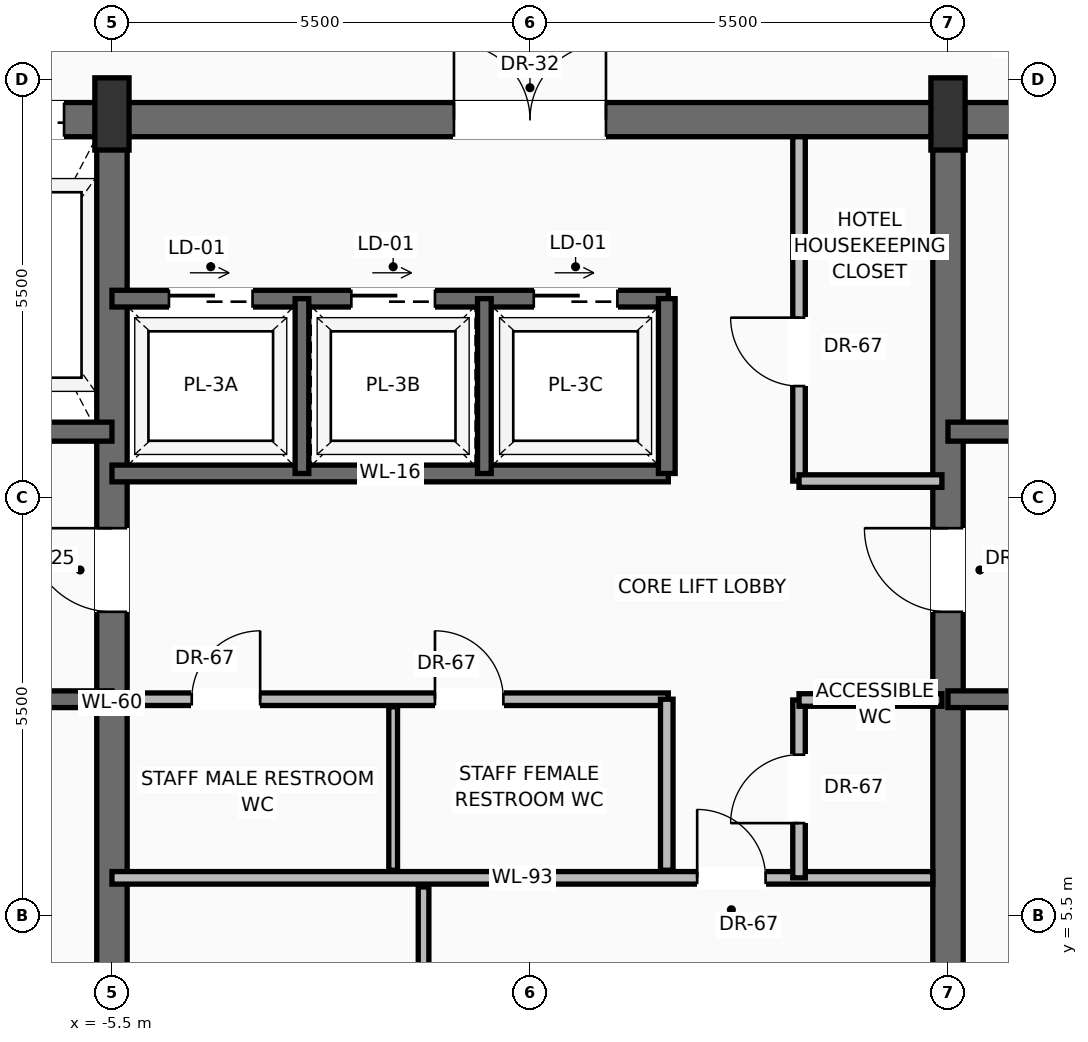
"""IFC4 building model, lengths in metres.
Left out: names, types, materials, properties, quantities, classifications, styles, units other than length and angle.
Written with IfcOpenShell. Run it as: python <this file> out.ifc"""

import sys

from ifc_helpers import new_model, si_unit, direction, frame, frame_2d, origin, origin_2d, place, context, subcontext, project, spatial, rectangle, extrude, source, transform, mapped, element, fill, save


model = new_model("IFC4")
c1 = context("Model", 3, precision=1e-05, world=origin(), true_north=direction((0.0, 1.0)))
c2 = subcontext(c1, "Body", "Model", "MODEL_VIEW")
j1 = project(units=[si_unit("LENGTHUNIT", "METRE"), si_unit("PLANEANGLEUNIT", "RADIAN")], contexts=[c1])
p1 = place(None, origin())
s1 = spatial("IfcSite", under=j1, at=p1, CompositionType="ELEMENT")
p2 = place(p1, origin())
s2 = spatial("IfcBuilding", under=s1, at=p2, CompositionType="ELEMENT")
p3 = place(p2, frame((0.0, 0.0, 297.15)))
s3 = spatial("IfcBuildingStorey", under=s2, at=p3, CompositionType="ELEMENT", Elevation=297.15)
p4 = place(p3, frame((-10.6, 15.975, 0.0), z_axis=(0.0, 0.0, 1.0), x_axis=(1.0, 0.0, 0.0)))
e1 = element("IfcWall", 1, at=p4, inside=s3, PredefinedType="SHEAR", context=c2, shape_type="SweptSolid", body=[
    extrude(rectangle(XDim=21.2, YDim=0.45, at=frame_2d((10.6, 0.0))), origin(), (0.0, 0.0, 1.0), 3.24),
])
p5 = place(p4, frame((3.17, 0.0, 0.0)))
e2 = element("IfcOpeningElement", 2, at=p5, cuts=e1, PredefinedType="OPENING", context=c2, shape_type="SweptSolid", body=[
    extrude(rectangle(XDim=1.3, YDim=2.3, at=frame_2d((0.65, 1.15))), frame((0.0, 0.235, 0.0), z_axis=(0.0, -1.0, 0.0), x_axis=(1.0, 0.0, 0.0)), (0.0, 0.0, 1.0), 0.47),
])
p6 = place(p4, frame((9.6, 0.0, 0.0)))
e3 = element("IfcOpeningElement", 3, at=p6, cuts=e1, PredefinedType="OPENING", context=c2, shape_type="SweptSolid", body=[
    extrude(rectangle(XDim=2.0, YDim=2.4, at=frame_2d((1.0, 1.2))), frame((0.0, 0.235, 0.0), z_axis=(0.0, -1.0, 0.0), x_axis=(1.0, 0.0, 0.0)), (0.0, 0.0, 1.0), 0.47),
])
p7 = place(p3, frame((-5.5, 0.625, 0.0), z_axis=(0.0, 0.0, 1.0), x_axis=(0.0, 1.0, 0.0)))
e4 = element("IfcWall", 4, at=p7, inside=s3, PredefinedType="SHEAR", context=c2, shape_type="SweptSolid", body=[
    extrude(rectangle(XDim=15.35, YDim=0.4, at=frame_2d((7.675, 0.0))), origin(), (0.0, 0.0, 1.0), 3.24),
])
p8 = place(p7, frame((8.875, 0.0, 0.0)))
e5 = element("IfcOpeningElement", 5, at=p8, cuts=e4, PredefinedType="OPENING", context=c2, shape_type="SweptSolid", body=[
    extrude(rectangle(XDim=1.1, YDim=2.2, at=frame_2d((0.55, 1.1))), frame((0.0, 0.21, 0.0), z_axis=(0.0, -1.0, 0.0), x_axis=(1.0, 0.0, 0.0)), (0.0, 0.0, 1.0), 0.42),
])
p9 = place(p3, frame((5.5, 0.625, 0.0), z_axis=(0.0, 0.0, 1.0), x_axis=(0.0, 1.0, 0.0)))
e6 = element("IfcWall", 6, at=p9, inside=s3, PredefinedType="SHEAR", context=c2, shape_type="SweptSolid", body=[
    extrude(rectangle(XDim=15.35, YDim=0.4, at=frame_2d((7.675, 0.0))), origin(), (0.0, 0.0, 1.0), 3.24),
])
p10 = place(p9, frame((8.875, 0.0, 0.0)))
e7 = element("IfcOpeningElement", 7, at=p10, cuts=e6, PredefinedType="OPENING", context=c2, shape_type="SweptSolid", body=[
    extrude(rectangle(XDim=1.1, YDim=2.2, at=frame_2d((0.55, 1.1))), frame((0.0, 0.21, 0.0), z_axis=(0.0, -1.0, 0.0), x_axis=(1.0, 0.0, 0.0)), (0.0, 0.0, 1.0), 0.42),
])
m1 = source(origin(), c2, "Body", "SweptSolid", [
    extrude(rectangle(XDim=0.45, YDim=0.95, at=origin_2d()), origin(), (0.0, 0.0, 1.0), 3.45),
])
for number, where, z_axis, x_axis in (
    (8, (-5.5, 16.05, 0.0), (0.0, 0.0, 1.0), (1.0, 0.0, 0.0)),
    (9, (5.5, 16.05, 0.0), (0.0, 0.0, 1.0), (1.0, 0.0, 0.0)),
):
    element("IfcColumn", number, at=place(p3, frame(where, z_axis=z_axis, x_axis=x_axis)), inside=s3, PredefinedType="PILASTER", context=c2, shape_type="MappedRepresentation", body=[
        mapped(m1, transform((0.0, 0.0, 0.0), scale=1.0)),
    ])
p11 = place(p3, frame((-5.5, 8.35, 0.0), z_axis=(0.0, 0.0, 1.0), x_axis=(-1.0, 0.0, 0.0)))
e10 = element("IfcWall", 10, at=p11, inside=s3, PredefinedType="SOLIDWALL", context=c2, shape_type="SweptSolid", body=[
    extrude(rectangle(XDim=4.65, YDim=0.22, at=frame_2d((2.325, 0.0))), origin(), (0.0, 0.0, 1.0), 3.24),
])
p12 = place(p11, frame((2.5, 0.0, 0.0)))
e11 = element("IfcOpeningElement", 11, at=p12, cuts=e10, PredefinedType="OPENING", context=c2, shape_type="SweptSolid", body=[
    extrude(rectangle(XDim=1.15, YDim=2.2, at=frame_2d((0.575, 1.1))), frame((0.0, 0.12, 0.0), z_axis=(0.0, -1.0, 0.0), x_axis=(1.0, 0.0, 0.0)), (0.0, 0.0, 1.0), 0.24),
])
p13 = place(p3, frame((-5.5, 11.87, 0.0), z_axis=(0.0, 0.0, 1.0), x_axis=(-1.0, 0.0, 0.0)))
e12 = element("IfcWall", 12, at=p13, inside=s3, PredefinedType="SOLIDWALL", context=c2, shape_type="SweptSolid", body=[
    extrude(rectangle(XDim=4.65, YDim=0.25, at=frame_2d((2.325, 0.0))), origin(), (0.0, 0.0, 1.0), 3.24),
])
p14 = place(p13, frame((2.95, 0.0, 0.0)))
e13 = element("IfcOpeningElement", 13, at=p14, cuts=e12, PredefinedType="OPENING", context=c2, shape_type="SweptSolid", body=[
    extrude(rectangle(XDim=1.2, YDim=2.25, at=frame_2d((0.6, 1.125))), frame((0.0, 0.135, 0.0), z_axis=(0.0, -1.0, 0.0), x_axis=(1.0, 0.0, 0.0)), (0.0, 0.0, 1.0), 0.27),
])
p15 = place(p3, frame((10.15, 8.35, 0.0), z_axis=(0.0, 0.0, 1.0), x_axis=(-1.0, 0.0, 0.0)))
e14 = element("IfcWall", 14, at=p15, inside=s3, PredefinedType="SOLIDWALL", context=c2, shape_type="SweptSolid", body=[
    extrude(rectangle(XDim=4.65, YDim=0.22, at=frame_2d((2.325, 0.0))), origin(), (0.0, 0.0, 1.0), 3.24),
])
p16 = place(p15, frame((1.0, 0.0, 0.0)))
e15 = element("IfcOpeningElement", 15, at=p16, cuts=e14, PredefinedType="OPENING", context=c2, shape_type="SweptSolid", body=[
    extrude(rectangle(XDim=1.15, YDim=2.2, at=frame_2d((0.575, 1.1))), frame((0.0, 0.12, 0.0), z_axis=(0.0, -1.0, 0.0), x_axis=(1.0, 0.0, 0.0)), (0.0, 0.0, 1.0), 0.24),
])
p17 = place(p3, frame((10.15, 11.87, 0.0), z_axis=(0.0, 0.0, 1.0), x_axis=(-1.0, 0.0, 0.0)))
e16 = element("IfcWall", 16, at=p17, inside=s3, PredefinedType="SOLIDWALL", context=c2, shape_type="SweptSolid", body=[
    extrude(rectangle(XDim=4.65, YDim=0.25, at=frame_2d((2.325, 0.0))), origin(), (0.0, 0.0, 1.0), 3.24),
])
p18 = place(p17, frame((0.5, 0.0, 0.0)))
e17 = element("IfcOpeningElement", 17, at=p18, cuts=e16, PredefinedType="OPENING", context=c2, shape_type="SweptSolid", body=[
    extrude(rectangle(XDim=1.2, YDim=2.25, at=frame_2d((0.6, 1.125))), frame((0.0, 0.135, 0.0), z_axis=(0.0, -1.0, 0.0), x_axis=(1.0, 0.0, 0.0)), (0.0, 0.0, 1.0), 0.27),
])
p19 = place(p3, frame((-5.5, 6.0, 0.0), z_axis=(0.0, 0.0, 1.0), x_axis=(1.0, 0.0, 0.0)))
e18 = element("IfcWall", 18, at=p19, inside=s3, PredefinedType="PARTITIONING", context=c2, shape_type="SweptSolid", body=[
    extrude(rectangle(XDim=10.8, YDim=0.165, at=frame_2d((5.4, 0.0))), origin(), (0.0, 0.0, 1.0), 3.232),
])
p20 = place(p19, frame((7.7, 0.0, 0.0)))
e19 = element("IfcOpeningElement", 19, at=p20, cuts=e18, PredefinedType="OPENING", context=c2, shape_type="SweptSolid", body=[
    extrude(rectangle(XDim=0.9, YDim=2.1, at=frame_2d((0.45, 1.05))), frame((0.0, 0.093, 0.0), z_axis=(0.0, -1.0, 0.0), x_axis=(1.0, 0.0, 0.0)), (0.0, 0.0, 1.0), 0.185),
])
p21 = place(p3, frame((-1.4, 0.85, 0.0), z_axis=(0.0, 0.0, 1.0), x_axis=(0.0, 1.0, 0.0)))
e20 = element("IfcWall", 20, at=p21, inside=s3, PredefinedType="PARTITIONING", context=c2, shape_type="SweptSolid", body=[
    extrude(rectangle(XDim=5.03, YDim=0.14, at=frame_2d((2.515, 0.0))), origin(), (0.0, 0.0, 1.0), 3.232),
])
p22 = place(p21, frame((2.1, 0.0, 0.0)))
e21 = element("IfcOpeningElement", 21, at=p22, cuts=e20, PredefinedType="OPENING", context=c2, shape_type="SweptSolid", body=[
    extrude(rectangle(XDim=0.9, YDim=2.1, at=frame_2d((0.45, 1.05))), frame((0.0, 0.08, 0.0), z_axis=(0.0, -1.0, 0.0), x_axis=(1.0, 0.0, 0.0)), (0.0, 0.0, 1.0), 0.16),
])
p23 = place(p3, frame((3.54, 6.0, 0.0), z_axis=(0.0, 0.0, 1.0), x_axis=(0.0, 1.0, 0.0)))
e22 = element("IfcWall", 22, at=p23, inside=s3, PredefinedType="PARTITIONING", context=c2, shape_type="SweptSolid", body=[
    extrude(rectangle(XDim=2.34, YDim=0.165, at=frame_2d((1.17, 0.0))), origin(), (0.0, 0.0, 1.0), 3.232),
])
p24 = place(p23, frame((0.72, 0.0, 0.0)))
e23 = element("IfcOpeningElement", 23, at=p24, cuts=e22, PredefinedType="OPENING", context=c2, shape_type="SweptSolid", body=[
    extrude(rectangle(XDim=0.9, YDim=2.1, at=frame_2d((0.45, 1.05))), frame((0.0, 0.093, 0.0), z_axis=(0.0, -1.0, 0.0), x_axis=(1.0, 0.0, 0.0)), (0.0, 0.0, 1.0), 0.185),
])
p25 = place(p3, frame((3.54, 8.34, 0.0), z_axis=(0.0, 0.0, 1.0), x_axis=(1.0, 0.0, 0.0)))
e24 = element("IfcWall", 24, at=p25, inside=s3, PredefinedType="PARTITIONING", context=c2, shape_type="SweptSolid", body=[
    extrude(rectangle(XDim=1.88, YDim=0.165, at=frame_2d((0.94, 0.0))), origin(), (0.0, 0.0, 1.0), 3.232),
])
p26 = place(p3, frame((-5.3, 8.35, 0.0), z_axis=(0.0, 0.0, 1.0), x_axis=(1.0, 0.0, 0.0)))
e25 = element("IfcWall", 25, at=p26, inside=s3, PredefinedType="PARTITIONING", context=c2, shape_type="SweptSolid", body=[
    extrude(rectangle(XDim=7.12, YDim=0.165, at=frame_2d((3.56, 0.0))), origin(), (0.0, 0.0, 1.0), 3.232),
])
p27 = place(p26, frame((0.85, 0.0, 0.0)))
e26 = element("IfcOpeningElement", 26, at=p27, cuts=e25, PredefinedType="OPENING", context=c2, shape_type="SweptSolid", body=[
    extrude(rectangle(XDim=0.9, YDim=2.1, at=frame_2d((0.45, 1.05))), frame((0.0, 0.093, 0.0), z_axis=(0.0, -1.0, 0.0), x_axis=(1.0, 0.0, 0.0)), (0.0, 0.0, 1.0), 0.185),
])
p28 = place(p26, frame((4.05, 0.0, 0.0)))
e27 = element("IfcOpeningElement", 27, at=p28, cuts=e25, PredefinedType="OPENING", context=c2, shape_type="SweptSolid", body=[
    extrude(rectangle(XDim=0.9, YDim=2.1, at=frame_2d((0.45, 1.05))), frame((0.0, 0.093, 0.0), z_axis=(0.0, -1.0, 0.0), x_axis=(1.0, 0.0, 0.0)), (0.0, 0.0, 1.0), 0.185),
])
p29 = place(p3, frame((1.8, 6.1, 0.0), z_axis=(0.0, 0.0, 1.0), x_axis=(0.0, 1.0, 0.0)))
e28 = element("IfcWall", 28, at=p29, inside=s3, PredefinedType="PARTITIONING", context=c2, shape_type="SweptSolid", body=[
    extrude(rectangle(XDim=2.25, YDim=0.165, at=frame_2d((1.125, 0.0))), origin(), (0.0, 0.0, 1.0), 3.232),
])
p30 = place(p3, frame((-1.8, 6.1, 0.0), z_axis=(0.0, 0.0, 1.0), x_axis=(0.0, 1.0, 0.0)))
e29 = element("IfcWall", 29, at=p30, inside=s3, PredefinedType="PARTITIONING", context=c2, shape_type="SweptSolid", body=[
    extrude(rectangle(XDim=2.15, YDim=0.115, at=frame_2d((1.075, 0.0))), origin(), (0.0, 0.0, 1.0), 3.232),
])
p31 = place(p3, frame((-5.5, 11.32, 0.0), z_axis=(0.0, 0.0, 1.0), x_axis=(1.0, 0.0, 0.0)))
e30 = element("IfcWall", 30, at=p31, inside=s3, PredefinedType="SOLIDWALL", context=c2, shape_type="SweptSolid", body=[
    extrude(rectangle(XDim=7.32, YDim=0.22, at=frame_2d((3.66, 0.0))), origin(), (0.0, 0.0, 1.0), 3.24),
])
p32 = place(p3, frame((-5.5, 13.62, 0.0), z_axis=(0.0, 0.0, 1.0), x_axis=(1.0, 0.0, 0.0)))
e31 = element("IfcWall", 31, at=p32, inside=s3, PredefinedType="SOLIDWALL", context=c2, shape_type="SweptSolid", body=[
    extrude(rectangle(XDim=7.32, YDim=0.22, at=frame_2d((3.66, 0.0))), origin(), (0.0, 0.0, 1.0), 3.24),
])
p33 = place(p32, frame((0.75, 0.0, 0.0)))
e32 = element("IfcOpeningElement", 32, at=p33, cuts=e31, PredefinedType="OPENING", context=c2, shape_type="SweptSolid", body=[
    extrude(rectangle(XDim=1.1, YDim=2.2, at=frame_2d((0.55, 1.1))), frame((0.0, 0.12, 0.0), z_axis=(0.0, -1.0, 0.0), x_axis=(1.0, 0.0, 0.0)), (0.0, 0.0, 1.0), 0.24),
])
p34 = place(p32, frame((3.15, 0.0, 0.0)))
e33 = element("IfcOpeningElement", 33, at=p34, cuts=e31, PredefinedType="OPENING", context=c2, shape_type="SweptSolid", body=[
    extrude(rectangle(XDim=1.1, YDim=2.2, at=frame_2d((0.55, 1.1))), frame((0.0, 0.12, 0.0), z_axis=(0.0, -1.0, 0.0), x_axis=(1.0, 0.0, 0.0)), (0.0, 0.0, 1.0), 0.24),
])
p35 = place(p32, frame((5.55, 0.0, 0.0)))
e34 = element("IfcOpeningElement", 34, at=p35, cuts=e31, PredefinedType="OPENING", context=c2, shape_type="SweptSolid", body=[
    extrude(rectangle(XDim=1.1, YDim=2.2, at=frame_2d((0.55, 1.1))), frame((0.0, 0.12, 0.0), z_axis=(0.0, -1.0, 0.0), x_axis=(1.0, 0.0, 0.0)), (0.0, 0.0, 1.0), 0.24),
])
p36 = place(p3, frame((1.8, 11.32, 0.0), z_axis=(0.0, 0.0, 1.0), x_axis=(0.0, 1.0, 0.0)))
e35 = element("IfcWall", 35, at=p36, inside=s3, PredefinedType="SOLIDWALL", context=c2, shape_type="SweptSolid", body=[
    extrude(rectangle(XDim=2.3, YDim=0.22, at=frame_2d((1.15, 0.0))), origin(), (0.0, 0.0, 1.0), 3.24),
])
for number, where, z_axis, x_axis in (
    (36, (-3.0, 11.32, 0.0), (0.0, 0.0, 1.0), (0.0, 1.0, 0.0)),
    (37, (-0.6, 11.32, 0.0), (0.0, 0.0, 1.0), (0.0, 1.0, 0.0)),
):
    element("IfcWall", number, at=place(p3, frame(where, z_axis=z_axis, x_axis=x_axis)), inside=s3, PredefinedType="SOLIDWALL", context=c2, shape_type="SweptSolid", body=[
        extrude(rectangle(XDim=2.3, YDim=0.18, at=frame_2d((1.15, 0.0))), origin(), (0.0, 0.0, 1.0), 3.24),
    ])
p37 = place(p3, frame((3.54, 11.22, 0.0), z_axis=(0.0, 0.0, 1.0), x_axis=(0.0, 1.0, 0.0)))
e38 = element("IfcWall", 38, at=p37, inside=s3, PredefinedType="PARTITIONING", context=c2, shape_type="SweptSolid", body=[
    extrude(rectangle(XDim=4.53, YDim=0.165, at=frame_2d((2.265, 0.0))), origin(), (0.0, 0.0, 1.0), 3.232),
])
p38 = place(p37, frame((1.25, 0.0, 0.0)))
e39 = element("IfcOpeningElement", 39, at=p38, cuts=e38, PredefinedType="OPENING", context=c2, shape_type="SweptSolid", body=[
    extrude(rectangle(XDim=0.9, YDim=2.1, at=frame_2d((0.45, 1.05))), frame((0.0, 0.093, 0.0), z_axis=(0.0, -1.0, 0.0), x_axis=(1.0, 0.0, 0.0)), (0.0, 0.0, 1.0), 0.185),
])
p39 = place(p3, frame((3.54, 11.22, 0.0), z_axis=(0.0, 0.0, 1.0), x_axis=(1.0, 0.0, 0.0)))
e40 = element("IfcWall", 40, at=p39, inside=s3, PredefinedType="PARTITIONING", context=c2, shape_type="SweptSolid", body=[
    extrude(rectangle(XDim=1.88, YDim=0.165, at=frame_2d((0.94, 0.0))), origin(), (0.0, 0.0, 1.0), 3.232),
])
m2 = source(origin(), c2, "Body", "SweptSolid", [
    extrude(rectangle(XDim=1.1, YDim=2.2, at=frame_2d((0.55, 1.1))), frame((0.0, 0.025, 0.0), z_axis=(0.0, -1.0, 0.0), x_axis=(1.0, 0.0, 0.0)), (0.0, 0.0, 1.0), 0.05),
])
p40 = place(p8, origin())
e41 = element("IfcDoor", 41, at=p40, inside=s3, OperationType="SINGLE_SWING_RIGHT", PredefinedType="DOOR", context=c2, shape_type="MappedRepresentation", body=[
    mapped(m2, transform((0.0, 0.0, 0.0), scale=1.0)),
])
fill(e5, e41)
m3 = source(origin(), c2, "Body", "SweptSolid", [
    extrude(rectangle(XDim=1.3, YDim=2.3, at=frame_2d((0.65, 1.15))), frame((0.0, 0.025, 0.0), z_axis=(0.0, -1.0, 0.0), x_axis=(1.0, 0.0, 0.0)), (0.0, 0.0, 1.0), 0.05),
])
p41 = place(p5, origin())
e42 = element("IfcDoor", 42, at=p41, inside=s3, OperationType="SLIDING_TO_RIGHT", PredefinedType="DOOR", context=c2, shape_type="MappedRepresentation", body=[
    mapped(m3, transform((0.0, 0.0, 0.0), scale=1.0)),
])
fill(e2, e42)
p42 = place(p10, origin())
e43 = element("IfcDoor", 43, at=p42, inside=s3, OperationType="SINGLE_SWING_RIGHT", PredefinedType="DOOR", context=c2, shape_type="MappedRepresentation", body=[
    mapped(m2, transform((0.0, 0.0, 0.0), scale=1.0)),
])
fill(e7, e43)
m4 = source(origin(), c2, "Body", "SweptSolid", [
    extrude(rectangle(XDim=2.0, YDim=2.4, at=frame_2d((1.0, 1.2))), frame((0.0, 0.025, 0.0), z_axis=(0.0, -1.0, 0.0), x_axis=(1.0, 0.0, 0.0)), (0.0, 0.0, 1.0), 0.05),
])
p43 = place(p6, origin())
e44 = element("IfcDoor", 44, at=p43, inside=s3, OperationType="DOUBLE_DOOR_SINGLE_SWING", PredefinedType="DOOR", context=c2, shape_type="MappedRepresentation", body=[
    mapped(m4, transform((0.0, 0.0, 0.0), scale=1.0)),
])
fill(e3, e44)
m5 = source(origin(), c2, "Body", "SweptSolid", [
    extrude(rectangle(XDim=0.9, YDim=2.1, at=frame_2d((0.45, 1.05))), frame((0.0, 0.025, 0.0), z_axis=(0.0, -1.0, 0.0), x_axis=(1.0, 0.0, 0.0)), (0.0, 0.0, 1.0), 0.05),
])
p44 = place(p20, origin())
e45 = element("IfcDoor", 45, at=p44, inside=s3, OperationType="SINGLE_SWING_LEFT", PredefinedType="DOOR", context=c2, shape_type="MappedRepresentation", body=[
    mapped(m5, transform((0.0, 0.0, 0.0), scale=1.0)),
])
fill(e19, e45)
p45 = place(p24, origin())
e46 = element("IfcDoor", 46, at=p45, inside=s3, OperationType="SINGLE_SWING_LEFT", PredefinedType="DOOR", context=c2, shape_type="MappedRepresentation", body=[
    mapped(m5, transform((0.0, 0.0, 0.0), scale=1.0)),
])
fill(e23, e46)
p46 = place(p27, origin())
e47 = element("IfcDoor", 47, at=p46, inside=s3, OperationType="SINGLE_SWING_RIGHT", PredefinedType="DOOR", context=c2, shape_type="MappedRepresentation", body=[
    mapped(m5, transform((0.0, 0.0, 0.0), scale=1.0)),
])
fill(e26, e47)
p47 = place(p28, origin())
e48 = element("IfcDoor", 48, at=p47, inside=s3, OperationType="SINGLE_SWING_LEFT", PredefinedType="DOOR", context=c2, shape_type="MappedRepresentation", body=[
    mapped(m5, transform((0.0, 0.0, 0.0), scale=1.0)),
])
fill(e27, e48)
m6 = source(origin(), c2, "Body", "SweptSolid", [
    extrude(rectangle(XDim=1.1, YDim=2.2, at=frame_2d((0.55, 1.1))), frame((0.0, 0.025, 0.0), z_axis=(0.0, -1.0, 0.0), x_axis=(1.0, 0.0, 0.0)), (0.0, 0.0, 1.0), 0.05),
])
p48 = place(p33, origin())
e49 = element("IfcDoor", 49, at=p48, inside=s3, OperationType="SLIDING_TO_RIGHT", PredefinedType="DOOR", context=c2, shape_type="MappedRepresentation", body=[
    mapped(m6, transform((0.0, 0.0, 0.0), scale=1.0)),
])
fill(e32, e49)
p49 = place(p34, origin())
e50 = element("IfcDoor", 50, at=p49, inside=s3, OperationType="SLIDING_TO_RIGHT", PredefinedType="DOOR", context=c2, shape_type="MappedRepresentation", body=[
    mapped(m6, transform((0.0, 0.0, 0.0), scale=1.0)),
])
fill(e33, e50)
p50 = place(p35, origin())
e51 = element("IfcDoor", 51, at=p50, inside=s3, OperationType="SLIDING_TO_RIGHT", PredefinedType="DOOR", context=c2, shape_type="MappedRepresentation", body=[
    mapped(m6, transform((0.0, 0.0, 0.0), scale=1.0)),
])
fill(e34, e51)
p51 = place(p38, origin())
e52 = element("IfcDoor", 52, at=p51, inside=s3, OperationType="SINGLE_SWING_RIGHT", PredefinedType="DOOR", context=c2, shape_type="MappedRepresentation", body=[
    mapped(m5, transform((0.0, 0.0, 0.0), scale=1.0)),
])
fill(e39, e52)
save(model, sys.argv[1])
